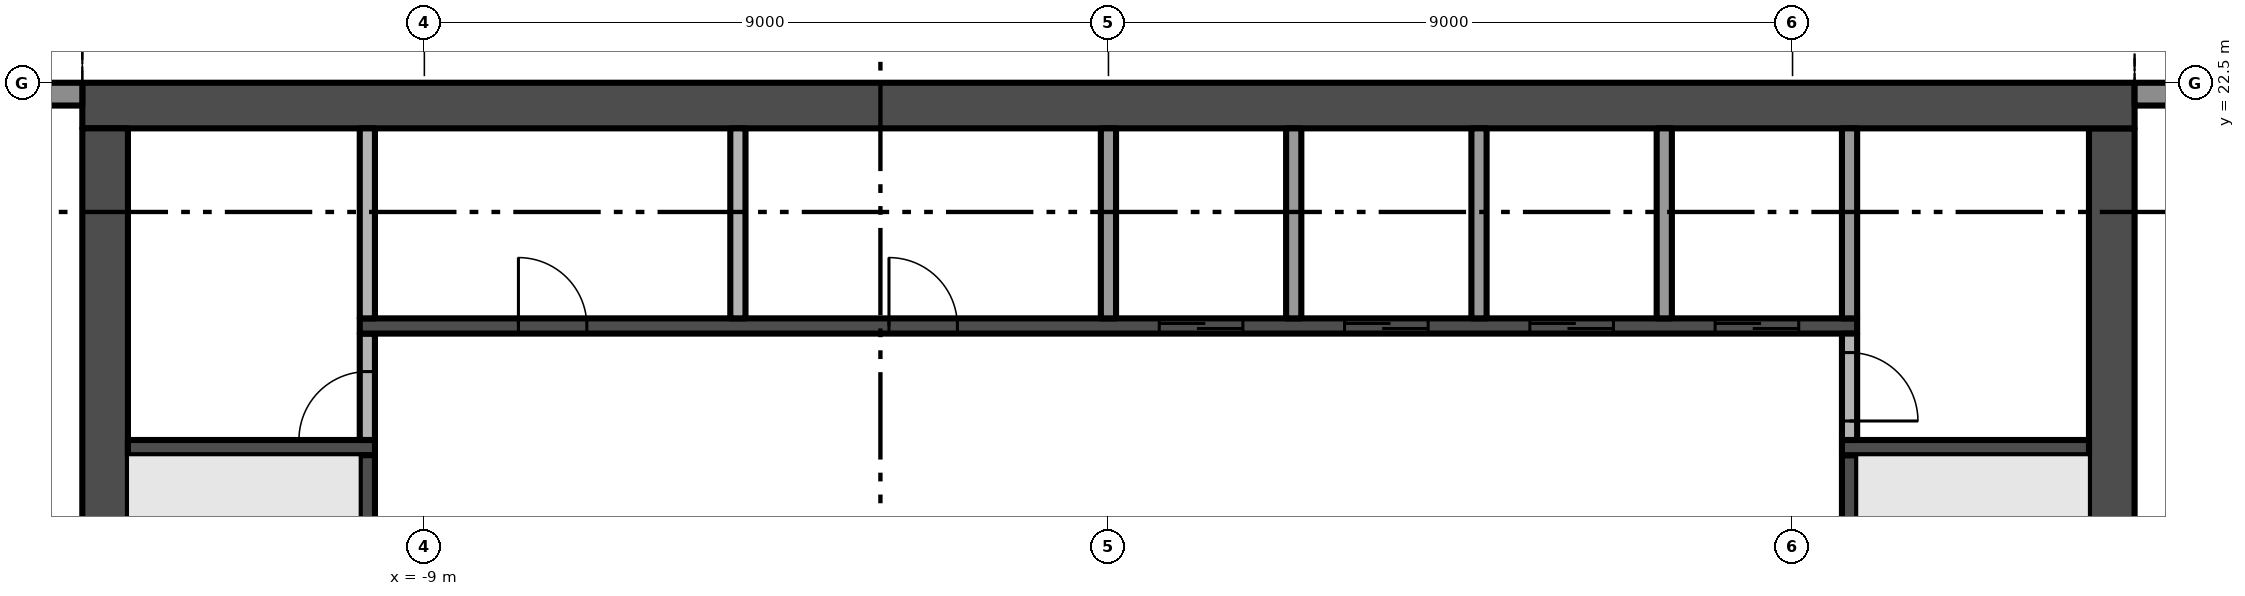
"""IFC4 building model, lengths in metres.
Left out: names, types, materials, properties, quantities, classifications, styles, units other than length and angle.
Written with IfcOpenShell. Run it as: python <this file> out.ifc"""

import sys

from ifc_helpers import new_model, si_unit, direction, frame, frame_2d, origin, place, context, subcontext, project, spatial, polyline, rectangle, outline, extrude, element, fill, save


model = new_model("IFC4")
c1 = context("Model", 3, precision=1e-05, world=origin(), true_north=direction((0.0, 1.0)))
c2 = subcontext(c1, "Body", "Model", "MODEL_VIEW")
j1 = project(units=[si_unit("LENGTHUNIT", "METRE"), si_unit("PLANEANGLEUNIT", "RADIAN")], contexts=[c1])
p1 = place(None, origin())
s1 = spatial("IfcSite", under=j1, at=p1, CompositionType="ELEMENT")
p2 = place(p1, origin())
s2 = spatial("IfcBuilding", under=s1, at=p2, CompositionType="ELEMENT")
p3 = place(p2, frame((0.0, 0.0, 257.8)))
s3 = spatial("IfcBuildingStorey", under=s2, at=p3, CompositionType="ELEMENT", Elevation=257.8)
p4 = place(p3, frame((13.2, 5.1, -0.3), z_axis=(0.0, 0.0, 1.0), x_axis=(0.0, 1.0, 0.0)))
e1 = element("IfcWall", 1, at=p4, inside=s3, PredefinedType="SHEAR", context=c2, shape_type="SweptSolid", body=[
    extrude(rectangle(XDim=16.8, YDim=0.6, at=frame_2d((8.4, 0.0))), origin(), (0.0, 0.0, 1.0), 3.8),
])
p5 = place(p4, frame((6.3, 0.0, 0.3)))
e2 = element("IfcOpeningElement", 2, at=p5, cuts=e1, PredefinedType="OPENING", context=c2, shape_type="SweptSolid", body=[
    extrude(rectangle(XDim=1.2, YDim=2.2, at=frame_2d((0.6, 1.1))), frame((0.0, 0.31, 0.0), z_axis=(0.0, -1.0, 0.0), x_axis=(1.0, 0.0, 0.0)), (0.0, 0.0, 1.0), 0.62),
])
p6 = place(p3, frame((13.5, 22.2, -0.3), z_axis=(0.0, 0.0, 1.0), x_axis=(-1.0, 0.0, 0.0)))
e3 = element("IfcWall", 3, at=p6, inside=s3, PredefinedType="SHEAR", context=c2, shape_type="SweptSolid", body=[
    extrude(rectangle(XDim=27.0, YDim=0.6, at=frame_2d((13.5, 0.0))), origin(), (0.0, 0.0, 1.0), 3.8),
])
p7 = place(p3, frame((-13.2, 21.9, -0.3), z_axis=(0.0, 0.0, 1.0), x_axis=(0.0, -1.0, 0.0)))
e4 = element("IfcWall", 4, at=p7, inside=s3, PredefinedType="SHEAR", context=c2, shape_type="SweptSolid", body=[
    extrude(rectangle(XDim=16.8, YDim=0.6, at=frame_2d((8.4, 0.0))), origin(), (0.0, 0.0, 1.0), 3.8),
])
p8 = place(p7, frame((9.3, 0.0, 0.3)))
e5 = element("IfcOpeningElement", 5, at=p8, cuts=e4, PredefinedType="OPENING", context=c2, shape_type="SweptSolid", body=[
    extrude(rectangle(XDim=1.2, YDim=2.2, at=frame_2d((0.6, 1.1))), frame((0.0, 0.31, 0.0), z_axis=(0.0, -1.0, 0.0), x_axis=(1.0, 0.0, 0.0)), (0.0, 0.0, 1.0), 0.62),
])
p9 = place(p3, frame((13.5, 22.35, 0.0), z_axis=(0.0, 0.0, 1.0), x_axis=(1.0, 0.0, 0.0)))
e6 = element("IfcWall", 6, at=p9, inside=s3, PredefinedType="SOLIDWALL", context=c2, shape_type="SweptSolid", body=[
    extrude(rectangle(XDim=4.05, YDim=0.3, at=frame_2d((2.025, 0.0))), origin(), (0.0, 0.0, 1.0), 3.5),
])
p10 = place(p9, frame((3.1, 0.0, 0.45)))
e7 = element("IfcOpeningElement", 7, at=p10, cuts=e6, PredefinedType="OPENING", context=c2, shape_type="SweptSolid", body=[
    extrude(rectangle(XDim=0.65, YDim=2.65, at=frame_2d((0.325, 1.325))), frame((0.0, 0.16, 0.0), z_axis=(0.0, -1.0, 0.0), x_axis=(1.0, 0.0, 0.0)), (0.0, 0.0, 1.0), 0.32),
])
p11 = place(p9, frame((0.55, 0.0, 0.0)))
e8 = element("IfcOpeningElement", 8, at=p11, cuts=e6, PredefinedType="OPENING", context=c2, shape_type="SweptSolid", body=[
    extrude(rectangle(XDim=2.4, YDim=2.4, at=frame_2d((1.2, 1.2))), frame((0.0, 0.16, 0.0), z_axis=(0.0, -1.0, 0.0), x_axis=(1.0, 0.0, 0.0)), (0.0, 0.0, 1.0), 0.32),
])
p12 = place(p3, frame((-17.55, 22.35, 0.0), z_axis=(0.0, 0.0, 1.0), x_axis=(1.0, 0.0, 0.0)))
e9 = element("IfcWall", 9, at=p12, inside=s3, PredefinedType="SOLIDWALL", context=c2, shape_type="SweptSolid", body=[
    extrude(rectangle(XDim=4.05, YDim=0.3, at=frame_2d((2.025, 0.0))), origin(), (0.0, 0.0, 1.0), 3.5),
])
p13 = place(p12, frame((0.3, 0.0, 0.45)))
e10 = element("IfcOpeningElement", 10, at=p13, cuts=e9, PredefinedType="OPENING", context=c2, shape_type="SweptSolid", body=[
    extrude(rectangle(XDim=3.2, YDim=2.65, at=frame_2d((1.6, 1.325))), frame((0.0, 0.16, 0.0), z_axis=(0.0, -1.0, 0.0), x_axis=(1.0, 0.0, 0.0)), (0.0, 0.0, 1.0), 0.32),
])
p14 = place(p3, origin())
e11 = element("IfcWall", 11, at=p14, inside=s3, PredefinedType="USERDEFINED", context=c2, shape_type="SweptSolid", body=[
    extrude(outline(polyline([(22.5, 24.3), (21.0, 23.595), (19.5, 23.159), (18.75, 23.1), (18.0, 23.159), (16.5, 23.595), (15.0, 24.3), (13.5, 25.005), (13.394, 24.779), (14.894, 24.074), (16.411, 23.36), (17.955, 22.911), (18.75, 22.849), (19.545, 22.911), (21.089, 23.36), (22.606, 24.074), (22.5, 24.3)])), origin(), (0.0, 0.0, 1.0), 0.9),
])
p15 = place(p3, origin())
e12 = element("IfcWall", 12, at=p15, inside=s3, PredefinedType="USERDEFINED", context=c2, shape_type="SweptSolid", body=[
    extrude(outline(polyline([(-13.5, 24.3), (-15.0, 23.595), (-16.5, 23.159), (-17.25, 23.1), (-18.0, 23.159), (-19.5, 23.595), (-21.0, 24.3), (-22.5, 25.005), (-22.606, 24.779), (-21.106, 24.074), (-19.589, 23.36), (-18.045, 22.911), (-17.25, 22.849), (-16.455, 22.911), (-14.911, 23.36), (-13.394, 24.074), (-13.5, 24.3)])), origin(), (0.0, 0.0, 1.0), 0.9),
])
p16 = place(p3, frame((-12.9, 17.7, 0.0), z_axis=(0.0, 0.0, 1.0), x_axis=(1.0, 0.0, 0.0)))
e13 = element("IfcWall", 13, at=p16, inside=s3, PredefinedType="SHEAR", context=c2, shape_type="SweptSolid", body=[
    extrude(rectangle(XDim=3.25, YDim=0.2, at=frame_2d((1.625, 0.0))), origin(), (0.0, 0.0, 1.0), 3.5),
])
p17 = place(p3, frame((-9.75, 16.1, 0.0), z_axis=(0.0, 0.0, 1.0), x_axis=(0.0, 1.0, 0.0)))
e14 = element("IfcWall", 14, at=p17, inside=s3, PredefinedType="SHEAR", context=c2, shape_type="SweptSolid", body=[
    extrude(rectangle(XDim=1.5, YDim=0.2, at=frame_2d((0.75, 0.0))), origin(), (0.0, 0.0, 1.0), 3.5),
])
p18 = place(p3, frame((-9.75, 17.8, 0.0), z_axis=(0.0, 0.0, 1.0), x_axis=(0.0, 1.0, 0.0)))
e15 = element("IfcWall", 15, at=p18, inside=s3, PredefinedType="PARTITIONING", context=c2, shape_type="SweptSolid", body=[
    extrude(rectangle(XDim=1.4, YDim=0.2, at=frame_2d((0.7, 0.0))), origin(), (0.0, 0.0, 1.0), 3.5),
])
p19 = place(p18, origin())
e16 = element("IfcOpeningElement", 16, at=p19, cuts=e15, PredefinedType="OPENING", context=c2, shape_type="SweptSolid", body=[
    extrude(rectangle(XDim=0.9, YDim=2.1, at=frame_2d((0.45, 1.05))), frame((0.0, 0.11, 0.0), z_axis=(0.0, -1.0, 0.0), x_axis=(1.0, 0.0, 0.0)), (0.0, 0.0, 1.0), 0.22),
])
p20 = place(p3, frame((-9.85, 19.3, 0.0), z_axis=(0.0, 0.0, 1.0), x_axis=(1.0, 0.0, 0.0)))
e17 = element("IfcWall", 17, at=p20, inside=s3, PredefinedType="SHEAR", context=c2, shape_type="SweptSolid", body=[
    extrude(rectangle(XDim=19.7, YDim=0.2, at=frame_2d((9.85, 0.0))), origin(), (0.0, 0.0, 1.0), 3.5),
])
p21 = place(p20, frame((10.519, 0.0, 0.0)))
e18 = element("IfcOpeningElement", 18, at=p21, cuts=e17, PredefinedType="OPENING", context=c2, shape_type="SweptSolid", body=[
    extrude(rectangle(XDim=1.1, YDim=2.1, at=frame_2d((0.55, 1.05))), frame((0.0, 0.11, 0.0), z_axis=(0.0, -1.0, 0.0), x_axis=(1.0, 0.0, 0.0)), (0.0, 0.0, 1.0), 0.22),
])
p22 = place(p20, frame((12.956, 0.0, 0.0)))
e19 = element("IfcOpeningElement", 19, at=p22, cuts=e17, PredefinedType="OPENING", context=c2, shape_type="SweptSolid", body=[
    extrude(rectangle(XDim=1.1, YDim=2.1, at=frame_2d((0.55, 1.05))), frame((0.0, 0.11, 0.0), z_axis=(0.0, -1.0, 0.0), x_axis=(1.0, 0.0, 0.0)), (0.0, 0.0, 1.0), 0.22),
])
p23 = place(p20, frame((15.394, 0.0, 0.0)))
e20 = element("IfcOpeningElement", 20, at=p23, cuts=e17, PredefinedType="OPENING", context=c2, shape_type="SweptSolid", body=[
    extrude(rectangle(XDim=1.1, YDim=2.1, at=frame_2d((0.55, 1.05))), frame((0.0, 0.11, 0.0), z_axis=(0.0, -1.0, 0.0), x_axis=(1.0, 0.0, 0.0)), (0.0, 0.0, 1.0), 0.22),
])
p24 = place(p20, frame((17.831, 0.0, 0.0)))
e21 = element("IfcOpeningElement", 21, at=p24, cuts=e17, PredefinedType="OPENING", context=c2, shape_type="SweptSolid", body=[
    extrude(rectangle(XDim=1.1, YDim=2.1, at=frame_2d((0.55, 1.05))), frame((0.0, 0.11, 0.0), z_axis=(0.0, -1.0, 0.0), x_axis=(1.0, 0.0, 0.0)), (0.0, 0.0, 1.0), 0.22),
])
p25 = place(p20, frame((2.087, 0.0, 0.0)))
e22 = element("IfcOpeningElement", 22, at=p25, cuts=e17, PredefinedType="OPENING", context=c2, shape_type="SweptSolid", body=[
    extrude(rectangle(XDim=0.9, YDim=2.1, at=frame_2d((0.45, 1.05))), frame((0.0, 0.11, 0.0), z_axis=(0.0, -1.0, 0.0), x_axis=(1.0, 0.0, 0.0)), (0.0, 0.0, 1.0), 0.22),
])
p26 = place(p20, frame((6.963, 0.0, 0.0)))
e23 = element("IfcOpeningElement", 23, at=p26, cuts=e17, PredefinedType="OPENING", context=c2, shape_type="SweptSolid", body=[
    extrude(rectangle(XDim=0.9, YDim=2.1, at=frame_2d((0.45, 1.05))), frame((0.0, 0.11, 0.0), z_axis=(0.0, -1.0, 0.0), x_axis=(1.0, 0.0, 0.0)), (0.0, 0.0, 1.0), 0.22),
])
for number, where, z_axis, x_axis in (
    (24, (-9.75, 19.4, 0.0), (0.0, 0.0, 1.0), (0.0, 1.0, 0.0)),
    (25, (-4.875, 19.4, 0.0), (0.0, 0.0, 1.0), (0.0, 1.0, 0.0)),
    (26, (0.0, 19.4, 0.0), (0.0, 0.0, 1.0), (0.0, 1.0, 0.0)),
    (27, (2.438, 19.4, 0.0), (0.0, 0.0, 1.0), (0.0, 1.0, 0.0)),
    (28, (4.875, 19.4, 0.0), (0.0, 0.0, 1.0), (0.0, 1.0, 0.0)),
    (29, (7.312, 19.4, 0.0), (0.0, 0.0, 1.0), (0.0, 1.0, 0.0)),
):
    element("IfcWall", number, at=place(p3, frame(where, z_axis=z_axis, x_axis=x_axis)), inside=s3, PredefinedType="PARTITIONING", context=c2, shape_type="SweptSolid", body=[
        extrude(rectangle(XDim=2.5, YDim=0.2, at=frame_2d((1.25, 0.0))), origin(), (0.0, 0.0, 1.0), 3.5),
    ])
p27 = place(p3, frame((9.75, 16.1, 0.0), z_axis=(0.0, 0.0, 1.0), x_axis=(0.0, 1.0, 0.0)))
e30 = element("IfcWall", 30, at=p27, inside=s3, PredefinedType="SHEAR", context=c2, shape_type="SweptSolid", body=[
    extrude(rectangle(XDim=1.5, YDim=0.2, at=frame_2d((0.75, 0.0))), origin(), (0.0, 0.0, 1.0), 3.5),
])
p28 = place(p3, frame((9.65, 17.7, 0.0), z_axis=(0.0, 0.0, 1.0), x_axis=(1.0, 0.0, 0.0)))
e31 = element("IfcWall", 31, at=p28, inside=s3, PredefinedType="SHEAR", context=c2, shape_type="SweptSolid", body=[
    extrude(rectangle(XDim=3.25, YDim=0.2, at=frame_2d((1.625, 0.0))), origin(), (0.0, 0.0, 1.0), 3.5),
])
p29 = place(p3, frame((9.75, 19.2, 0.0), z_axis=(0.0, 0.0, 1.0), x_axis=(0.0, -1.0, 0.0)))
e32 = element("IfcWall", 32, at=p29, inside=s3, PredefinedType="PARTITIONING", context=c2, shape_type="SweptSolid", body=[
    extrude(rectangle(XDim=1.4, YDim=0.2, at=frame_2d((0.7, 0.0))), origin(), (0.0, 0.0, 1.0), 3.5),
])
p30 = place(p29, frame((0.25, 0.0, 0.0)))
e33 = element("IfcOpeningElement", 33, at=p30, cuts=e32, PredefinedType="OPENING", context=c2, shape_type="SweptSolid", body=[
    extrude(rectangle(XDim=0.9, YDim=2.1, at=frame_2d((0.45, 1.05))), frame((0.0, 0.11, 0.0), z_axis=(0.0, -1.0, 0.0), x_axis=(1.0, 0.0, 0.0)), (0.0, 0.0, 1.0), 0.22),
])
p31 = place(p3, frame((9.75, 19.4, 0.0), z_axis=(0.0, 0.0, 1.0), x_axis=(0.0, 1.0, 0.0)))
e34 = element("IfcWall", 34, at=p31, inside=s3, PredefinedType="PARTITIONING", context=c2, shape_type="SweptSolid", body=[
    extrude(rectangle(XDim=2.5, YDim=0.2, at=frame_2d((1.25, 0.0))), origin(), (0.0, 0.0, 1.0), 3.5),
])
p32 = place(p21, origin())
e35 = element("IfcDoor", 35, at=p32, inside=s3, OperationType="SLIDING_TO_RIGHT", PredefinedType="DOOR", context=c2, shape_type="SweptSolid", body=[
    extrude(rectangle(XDim=1.1, YDim=2.1, at=frame_2d((0.55, 1.05))), frame((0.0, 0.025, 0.0), z_axis=(0.0, -1.0, 0.0), x_axis=(1.0, 0.0, 0.0)), (0.0, 0.0, 1.0), 0.05),
])
fill(e18, e35)
p33 = place(p22, origin())
e36 = element("IfcDoor", 36, at=p33, inside=s3, OperationType="SLIDING_TO_RIGHT", PredefinedType="DOOR", context=c2, shape_type="SweptSolid", body=[
    extrude(rectangle(XDim=1.1, YDim=2.1, at=frame_2d((0.55, 1.05))), frame((0.0, 0.025, 0.0), z_axis=(0.0, -1.0, 0.0), x_axis=(1.0, 0.0, 0.0)), (0.0, 0.0, 1.0), 0.05),
])
fill(e19, e36)
p34 = place(p23, origin())
e37 = element("IfcDoor", 37, at=p34, inside=s3, OperationType="SLIDING_TO_RIGHT", PredefinedType="DOOR", context=c2, shape_type="SweptSolid", body=[
    extrude(rectangle(XDim=1.1, YDim=2.1, at=frame_2d((0.55, 1.05))), frame((0.0, 0.025, 0.0), z_axis=(0.0, -1.0, 0.0), x_axis=(1.0, 0.0, 0.0)), (0.0, 0.0, 1.0), 0.05),
])
fill(e20, e37)
p35 = place(p24, origin())
e38 = element("IfcDoor", 38, at=p35, inside=s3, OperationType="SLIDING_TO_RIGHT", PredefinedType="DOOR", context=c2, shape_type="SweptSolid", body=[
    extrude(rectangle(XDim=1.1, YDim=2.1, at=frame_2d((0.55, 1.05))), frame((0.0, 0.025, 0.0), z_axis=(0.0, -1.0, 0.0), x_axis=(1.0, 0.0, 0.0)), (0.0, 0.0, 1.0), 0.05),
])
fill(e21, e38)
p36 = place(p19, origin())
e39 = element("IfcDoor", 39, at=p36, inside=s3, OperationType="SINGLE_SWING_LEFT", PredefinedType="DOOR", context=c2, shape_type="SweptSolid", body=[
    extrude(rectangle(XDim=0.9, YDim=2.1, at=frame_2d((0.45, 1.05))), frame((0.0, 0.025, 0.0), z_axis=(0.0, -1.0, 0.0), x_axis=(1.0, 0.0, 0.0)), (0.0, 0.0, 1.0), 0.05),
])
fill(e16, e39)
p37 = place(p30, origin())
e40 = element("IfcDoor", 40, at=p37, inside=s3, OperationType="SINGLE_SWING_RIGHT", PredefinedType="DOOR", context=c2, shape_type="SweptSolid", body=[
    extrude(rectangle(XDim=0.9, YDim=2.1, at=frame_2d((0.45, 1.05))), frame((0.0, 0.025, 0.0), z_axis=(0.0, -1.0, 0.0), x_axis=(1.0, 0.0, 0.0)), (0.0, 0.0, 1.0), 0.05),
])
fill(e33, e40)
p38 = place(p25, origin())
e41 = element("IfcDoor", 41, at=p38, inside=s3, OperationType="SINGLE_SWING_LEFT", PredefinedType="DOOR", context=c2, shape_type="SweptSolid", body=[
    extrude(rectangle(XDim=0.9, YDim=2.1, at=frame_2d((0.45, 1.05))), frame((0.0, 0.025, 0.0), z_axis=(0.0, -1.0, 0.0), x_axis=(1.0, 0.0, 0.0)), (0.0, 0.0, 1.0), 0.05),
])
fill(e22, e41)
p39 = place(p26, origin())
e42 = element("IfcDoor", 42, at=p39, inside=s3, OperationType="SINGLE_SWING_LEFT", PredefinedType="DOOR", context=c2, shape_type="SweptSolid", body=[
    extrude(rectangle(XDim=0.9, YDim=2.1, at=frame_2d((0.45, 1.05))), frame((0.0, 0.025, 0.0), z_axis=(0.0, -1.0, 0.0), x_axis=(1.0, 0.0, 0.0)), (0.0, 0.0, 1.0), 0.05),
])
fill(e23, e42)
save(model, sys.argv[1])
